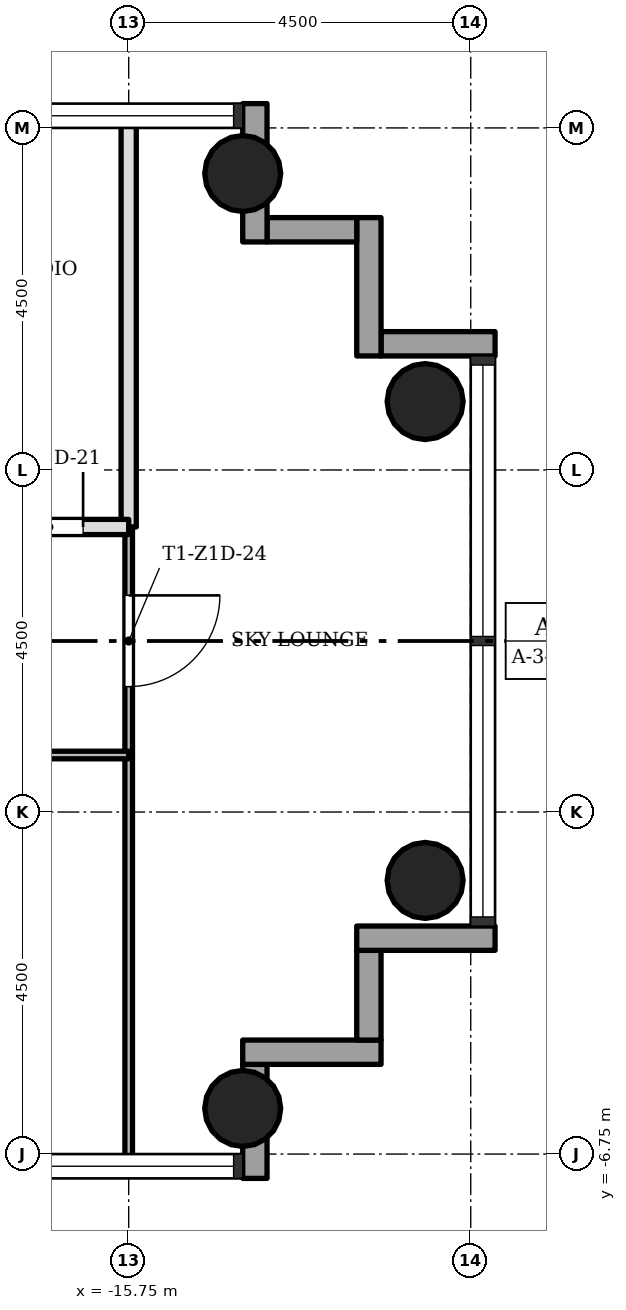
"""IFC4 building model, lengths in metres.
Left out: names, types, materials, properties, quantities, classifications, styles, units other than length and angle.
Written with IfcOpenShell. Run it as: python <this file> out.ifc"""

import sys

from ifc_helpers import new_model, si_unit, direction, frame, frame_2d, origin, origin_2d, place, context, subcontext, project, spatial, rectangle, hollow_circle, extrude, element, fill, save


model = new_model("IFC4")
c1 = context("Model", 3, precision=1e-05, world=origin(), true_north=direction((0.0, 1.0)))
c2 = subcontext(c1, "Body", "Model", "MODEL_VIEW")
j1 = project(units=[si_unit("LENGTHUNIT", "METRE"), si_unit("PLANEANGLEUNIT", "RADIAN")], contexts=[c1])
p1 = place(None, origin())
s1 = spatial("IfcSite", under=j1, at=p1, CompositionType="ELEMENT")
p2 = place(p1, origin())
s2 = spatial("IfcBuilding", under=s1, at=p2, CompositionType="ELEMENT")
p3 = place(p2, frame((0.0, 0.0, 55.1)))
s3 = spatial("IfcBuildingStorey", under=s2, at=p3, CompositionType="ELEMENT", Elevation=55.1)
for number, where, z_axis, x_axis in (
    (1, (-14.25, -6.15, 0.0), (0.0, 0.0, 1.0), (1.0, 0.0, 0.0)),
    (2, (-14.25, 6.15, 0.0), (0.0, 0.0, 1.0), (1.0, 0.0, 0.0)),
    (3, (-11.85, -3.15, 0.0), (0.0, 0.0, 1.0), (1.0, 0.0, 0.0)),
    (4, (-11.85, 3.15, 0.0), (0.0, 0.0, 1.0), (1.0, 0.0, 0.0)),
):
    element("IfcColumn", number, at=place(p3, frame(where, z_axis=z_axis, x_axis=x_axis)), inside=s3, PredefinedType="COLUMN", context=c2, shape_type="SweptSolid", body=[
        extrude(hollow_circle(Radius=0.5, WallThickness=0.036, at=origin_2d()), origin(), (0.0, 0.0, 1.0), 3.4),
    ])
p4 = place(p3, frame((-14.09, -7.07, -0.3), z_axis=(0.0, 0.0, 1.0), x_axis=(0.0, 1.0, 0.0)))
e5 = element("IfcWall", 5, at=p4, inside=s3, PredefinedType="STANDARD", context=c2, shape_type="SweptSolid", body=[
    extrude(rectangle(XDim=1.5, YDim=0.32, at=frame_2d((0.75, 0.0))), origin(), (0.0, 0.0, 1.0), 3.4),
])
p5 = place(p3, frame((-14.25, -5.41, -0.3), z_axis=(0.0, 0.0, 1.0), x_axis=(1.0, 0.0, 0.0)))
e6 = element("IfcWall", 6, at=p5, inside=s3, PredefinedType="STANDARD", context=c2, shape_type="SweptSolid", body=[
    extrude(rectangle(XDim=1.82, YDim=0.32, at=frame_2d((0.91, 0.0))), origin(), (0.0, 0.0, 1.0), 3.4),
])
p6 = place(p3, frame((-12.59, -5.25, -0.3), z_axis=(0.0, 0.0, 1.0), x_axis=(0.0, 1.0, 0.0)))
e7 = element("IfcWall", 7, at=p6, inside=s3, PredefinedType="STANDARD", context=c2, shape_type="SweptSolid", body=[
    extrude(rectangle(XDim=1.18, YDim=0.32, at=frame_2d((0.59, 0.0))), origin(), (0.0, 0.0, 1.0), 3.4),
])
p7 = place(p3, frame((-12.75, -3.91, -0.3), z_axis=(0.0, 0.0, 1.0), x_axis=(1.0, 0.0, 0.0)))
e8 = element("IfcWall", 8, at=p7, inside=s3, PredefinedType="STANDARD", context=c2, shape_type="SweptSolid", body=[
    extrude(rectangle(XDim=1.82, YDim=0.32, at=frame_2d((0.91, 0.0))), origin(), (0.0, 0.0, 1.0), 3.4),
])
p8 = place(p3, frame((-10.93, 3.91, -0.3), z_axis=(0.0, 0.0, 1.0), x_axis=(-1.0, 0.0, 0.0)))
e9 = element("IfcWall", 9, at=p8, inside=s3, PredefinedType="STANDARD", context=c2, shape_type="SweptSolid", body=[
    extrude(rectangle(XDim=1.5, YDim=0.32, at=frame_2d((0.75, 0.0))), origin(), (0.0, 0.0, 1.0), 3.4),
])
p9 = place(p3, frame((-12.59, 3.75, -0.3), z_axis=(0.0, 0.0, 1.0), x_axis=(0.0, 1.0, 0.0)))
e10 = element("IfcWall", 10, at=p9, inside=s3, PredefinedType="STANDARD", context=c2, shape_type="SweptSolid", body=[
    extrude(rectangle(XDim=1.82, YDim=0.32, at=frame_2d((0.91, 0.0))), origin(), (0.0, 0.0, 1.0), 3.4),
])
p10 = place(p3, frame((-12.75, 5.41, -0.3), z_axis=(0.0, 0.0, 1.0), x_axis=(-1.0, 0.0, 0.0)))
e11 = element("IfcWall", 11, at=p10, inside=s3, PredefinedType="STANDARD", context=c2, shape_type="SweptSolid", body=[
    extrude(rectangle(XDim=1.18, YDim=0.32, at=frame_2d((0.59, 0.0))), origin(), (0.0, 0.0, 1.0), 3.4),
])
p11 = place(p3, frame((-14.09, 5.25, -0.3), z_axis=(0.0, 0.0, 1.0), x_axis=(0.0, 1.0, 0.0)))
e12 = element("IfcWall", 12, at=p11, inside=s3, PredefinedType="STANDARD", context=c2, shape_type="SweptSolid", body=[
    extrude(rectangle(XDim=1.82, YDim=0.32, at=frame_2d((0.91, 0.0))), origin(), (0.0, 0.0, 1.0), 3.4),
])
p12 = place(p3, frame((-15.75, -6.85, 0.0), z_axis=(0.0, 0.0, 1.0), x_axis=(0.0, 1.0, 0.0)))
e13 = element("IfcWall", 13, at=p12, inside=s3, PredefinedType="PARTITIONING", context=c2, shape_type="SweptSolid", body=[
    extrude(rectangle(XDim=8.35, YDim=0.1, at=frame_2d((4.175, 0.0))), origin(), (0.0, 0.0, 1.0), 3.0),
])
p13 = place(p12, frame((6.25, 0.0, 0.0)))
e14 = element("IfcOpeningElement", 14, at=p13, cuts=e13, PredefinedType="OPENING", context=c2, shape_type="SweptSolid", body=[
    extrude(rectangle(XDim=1.2, YDim=2.1, at=frame_2d((0.6, 1.05))), frame((0.0, 0.06, 0.0), z_axis=(0.0, -1.0, 0.0), x_axis=(1.0, 0.0, 0.0)), (0.0, 0.0, 1.0), 0.12),
])
p14 = place(p3, frame((-15.75, 1.5, 0.0), z_axis=(0.0, 0.0, 1.0), x_axis=(0.0, 1.0, 0.0)))
e15 = element("IfcWall", 15, at=p14, inside=s3, PredefinedType="SOLIDWALL", context=c2, shape_type="SweptSolid", body=[
    extrude(rectangle(XDim=5.35, YDim=0.2, at=frame_2d((2.675, 0.0))), origin(), (0.0, 0.0, 1.0), 3.0),
])
p15 = place(p3, frame((-20.25, -1.5, 0.0), z_axis=(0.0, 0.0, 1.0), x_axis=(1.0, 0.0, 0.0)))
e16 = element("IfcWall", 16, at=p15, inside=s3, PredefinedType="PARTITIONING", context=c2, shape_type="SweptSolid", body=[
    extrude(rectangle(XDim=4.5, YDim=0.1, at=frame_2d((2.25, 0.0))), origin(), (0.0, 0.0, 1.0), 3.0),
])
p16 = place(p15, frame((1.8, 0.0, 0.0)))
e17 = element("IfcOpeningElement", 17, at=p16, cuts=e16, PredefinedType="OPENING", context=c2, shape_type="SweptSolid", body=[
    extrude(rectangle(XDim=0.9, YDim=2.1, at=frame_2d((0.45, 1.05))), frame((0.0, 0.06, 0.0), z_axis=(0.0, -1.0, 0.0), x_axis=(1.0, 0.0, 0.0)), (0.0, 0.0, 1.0), 0.12),
])
p17 = place(p3, frame((-20.25, 1.5, 0.0), z_axis=(0.0, 0.0, 1.0), x_axis=(1.0, 0.0, 0.0)))
e18 = element("IfcWall", 18, at=p17, inside=s3, PredefinedType="SOLIDWALL", context=c2, shape_type="SweptSolid", body=[
    extrude(rectangle(XDim=4.5, YDim=0.2, at=frame_2d((2.25, 0.0))), origin(), (0.0, 0.0, 1.0), 3.0),
])
p18 = place(p17, frame((3.0, 0.0, 0.0)))
e19 = element("IfcOpeningElement", 19, at=p18, cuts=e18, PredefinedType="OPENING", context=c2, shape_type="SweptSolid", body=[
    extrude(rectangle(XDim=0.9, YDim=2.1, at=frame_2d((0.45, 1.05))), frame((0.0, 0.11, 0.0), z_axis=(0.0, -1.0, 0.0), x_axis=(1.0, 0.0, 0.0)), (0.0, 0.0, 1.0), 0.22),
])
p19 = place(p18, origin())
e20 = element("IfcDoor", 20, at=p19, inside=s3, OperationType="SINGLE_SWING_LEFT", PredefinedType="DOOR", context=c2, shape_type="SweptSolid", body=[
    extrude(rectangle(XDim=0.9, YDim=2.1, at=frame_2d((0.45, 1.05))), frame((0.0, 0.025, 0.0), z_axis=(0.0, -1.0, 0.0), x_axis=(1.0, 0.0, 0.0)), (0.0, 0.0, 1.0), 0.05),
])
fill(e19, e20)
p20 = place(p13, origin())
e21 = element("IfcDoor", 21, at=p20, inside=s3, OperationType="SINGLE_SWING_RIGHT", PredefinedType="DOOR", context=c2, shape_type="SweptSolid", body=[
    extrude(rectangle(XDim=1.2, YDim=2.1, at=frame_2d((0.6, 1.05))), frame((0.0, 0.025, 0.0), z_axis=(0.0, -1.0, 0.0), x_axis=(1.0, 0.0, 0.0)), (0.0, 0.0, 1.0), 0.05),
])
fill(e14, e21)
save(model, sys.argv[1])
